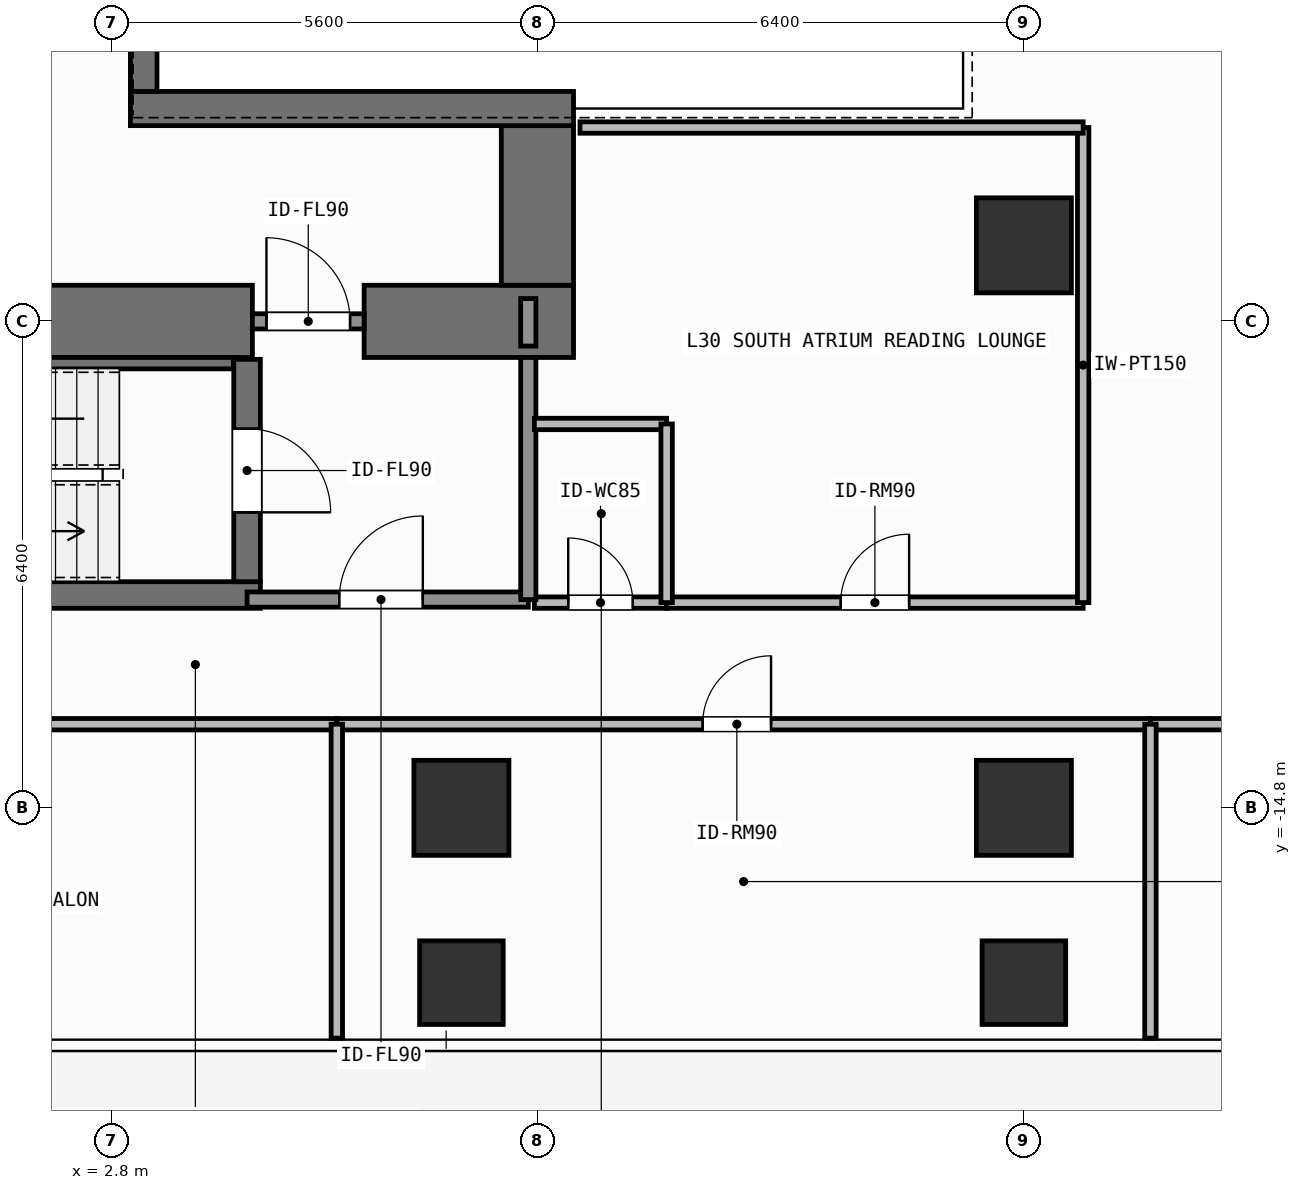
"""IFC4 building model, lengths in metres.
Left out: names, types, materials, properties, quantities, classifications, styles, units other than length and angle.
Written with IfcOpenShell. Run it as: python <this file> out.ifc"""

import sys

from ifc_helpers import new_model, si_unit, direction, frame, frame_2d, origin, origin_2d, place, context, subcontext, project, spatial, rectangle, extrude, element, fill, save


model = new_model("IFC4")
c1 = context("Model", 3, precision=1e-05, world=origin(), true_north=direction((0.0, 1.0)))
c2 = subcontext(c1, "Body", "Model", "MODEL_VIEW")
j1 = project(units=[si_unit("LENGTHUNIT", "METRE"), si_unit("PLANEANGLEUNIT", "RADIAN")], contexts=[c1])
p1 = place(None, origin())
s1 = spatial("IfcSite", under=j1, at=p1, CompositionType="ELEMENT")
p2 = place(p1, origin())
s2 = spatial("IfcBuilding", under=s1, at=p2, CompositionType="ELEMENT")
p3 = place(p2, frame((0.0, 0.0, 121.2)))
s3 = spatial("IfcBuildingStorey", under=s2, at=p3, CompositionType="ELEMENT", Elevation=121.2)
p4 = place(p3, frame((-2.62, -8.4, 0.0), z_axis=(0.0, 0.0, 1.0), x_axis=(1.0, 0.0, 0.0)))
e1 = element("IfcWall", 1, at=p4, inside=s3, PredefinedType="SHEAR", context=c2, shape_type="SweptSolid", body=[
    extrude(rectangle(XDim=7.27, YDim=0.95, at=frame_2d((3.635, 0.0))), origin(), (0.0, 0.0, 1.0), 3.9),
])
p5 = place(p3, frame((6.12, -8.4, 0.0), z_axis=(0.0, 0.0, 1.0), x_axis=(1.0, 0.0, 0.0)))
e2 = element("IfcWall", 2, at=p5, inside=s3, PredefinedType="SHEAR", context=c2, shape_type="SweptSolid", body=[
    extrude(rectangle(XDim=2.755, YDim=0.95, at=frame_2d((1.377, 0.0))), origin(), (0.0, 0.0, 1.0), 3.9),
])
p6 = place(p3, frame((8.4, -7.925, 0.0), z_axis=(0.0, 0.0, 1.0), x_axis=(0.0, 1.0, 0.0)))
e3 = element("IfcWall", 3, at=p6, inside=s3, PredefinedType="SHEAR", context=c2, shape_type="SweptSolid", body=[
    extrude(rectangle(XDim=2.1, YDim=0.95, at=frame_2d((1.05, 0.0))), origin(), (0.0, 0.0, 1.0), 3.9),
])
p7 = place(p3, frame((3.045, -5.6, 0.0), z_axis=(0.0, 0.0, 1.0), x_axis=(1.0, 0.0, 0.0)))
e4 = element("IfcWall", 4, at=p7, inside=s3, PredefinedType="SHEAR", context=c2, shape_type="SweptSolid", body=[
    extrude(rectangle(XDim=5.83, YDim=0.45, at=frame_2d((2.915, 0.0))), origin(), (0.0, 0.0, 1.0), 3.9),
])
p8 = place(p3, frame((3.22, -5.375, 0.0), z_axis=(0.0, 0.0, 1.0), x_axis=(0.0, 1.0, 0.0)))
e5 = element("IfcWall", 5, at=p8, inside=s3, PredefinedType="SHEAR", context=c2, shape_type="SweptSolid", body=[
    extrude(rectangle(XDim=10.75, YDim=0.35, at=frame_2d((5.375, 0.0))), origin(), (0.0, 0.0, 1.0), 3.9),
])
p9 = place(p3, frame((-2.555, -12.0, 0.0), z_axis=(0.0, 0.0, 1.0), x_axis=(1.0, 0.0, 0.0)))
e6 = element("IfcWall", 6, at=p9, inside=s3, PredefinedType="SHEAR", context=c2, shape_type="SweptSolid", body=[
    extrude(rectangle(XDim=7.31, YDim=0.35, at=frame_2d((3.655, 0.0))), origin(), (0.0, 0.0, 1.0), 3.9),
])
p10 = place(p3, frame((-2.2, -8.95, 0.0), z_axis=(0.0, 0.0, 1.0), x_axis=(1.0, 0.0, 0.0)))
e7 = element("IfcWall", 7, at=p10, inside=s3, PredefinedType="SHEAR", context=c2, shape_type="SweptSolid", body=[
    extrude(rectangle(XDim=6.6, YDim=0.15, at=frame_2d((3.3, 0.0))), origin(), (0.0, 0.0, 1.0), 3.9),
])
p11 = place(p3, frame((4.58, -8.9, 0.0), z_axis=(0.0, 0.0, 1.0), x_axis=(0.0, -1.0, 0.0)))
e8 = element("IfcWall", 8, at=p11, inside=s3, PredefinedType="SHEAR", context=c2, shape_type="SweptSolid", body=[
    extrude(rectangle(XDim=2.925, YDim=0.35, at=frame_2d((1.462, 0.0))), origin(), (0.0, 0.0, 1.0), 3.9),
])
p12 = place(p11, frame((0.913, 0.0, 0.0)))
e9 = element("IfcOpeningElement", 9, at=p12, cuts=e8, PredefinedType="OPENING", context=c2, shape_type="SweptSolid", body=[
    extrude(rectangle(XDim=1.1, YDim=2.15, at=frame_2d((0.55, 1.075))), frame((0.0, 0.185, 0.0), z_axis=(0.0, -1.0, 0.0), x_axis=(1.0, 0.0, 0.0)), (0.0, 0.0, 1.0), 0.37),
])
for number, where, z_axis, x_axis in (
    (10, (7.4, -14.8, 0.0), (0.0, 0.0, 1.0), (1.0, 0.0, 0.0)),
    (11, (14.8, -14.8, 0.0), (0.0, 0.0, 1.0), (1.0, 0.0, 0.0)),
    (12, (14.8, -7.4, 0.0), (0.0, 0.0, 1.0), (1.0, 0.0, 0.0)),
):
    element("IfcColumn", number, at=place(p3, frame(where, z_axis=z_axis, x_axis=x_axis)), inside=s3, PredefinedType="COLUMN", context=c2, shape_type="SweptSolid", body=[
        extrude(rectangle(XDim=1.25, YDim=1.25, at=origin_2d()), origin(), (0.0, 0.0, 1.0), 3.9),
    ])
for number, where, z_axis, x_axis in (
    (13, (7.4, -17.1, 0.0), (0.0, 0.0, 1.0), (1.0, 0.0, 0.0)),
    (14, (14.8, -17.1, 0.0), (0.0, 0.0, 1.0), (1.0, 0.0, 0.0)),
):
    element("IfcColumn", number, at=place(p3, frame(where, z_axis=z_axis, x_axis=x_axis)), inside=s3, PredefinedType="COLUMN", context=c2, shape_type="SweptSolid", body=[
        extrude(rectangle(XDim=1.1, YDim=1.1, at=origin_2d()), origin(), (0.0, 0.0, 1.0), 3.9),
    ])
p13 = place(p3, frame((4.58, -12.06, 0.0), z_axis=(0.0, 0.0, 1.0), x_axis=(1.0, 0.0, 0.0)))
e15 = element("IfcWall", 15, at=p13, inside=s3, PredefinedType="SOLIDWALL", context=c2, shape_type="SweptSolid", body=[
    extrude(rectangle(XDim=3.7, YDim=0.2, at=frame_2d((1.85, 0.0))), origin(), (0.0, 0.0, 1.0), 3.68),
])
p14 = place(p13, frame((1.212, 0.0, 0.0)))
e16 = element("IfcOpeningElement", 16, at=p14, cuts=e15, PredefinedType="OPENING", context=c2, shape_type="SweptSolid", body=[
    extrude(rectangle(XDim=1.1, YDim=2.15, at=frame_2d((0.55, 1.075))), frame((0.0, 0.11, 0.0), z_axis=(0.0, -1.0, 0.0), x_axis=(1.0, 0.0, 0.0)), (0.0, 0.0, 1.0), 0.22),
])
p15 = place(p3, frame((4.65, -8.4, 0.0), z_axis=(0.0, 0.0, 1.0), x_axis=(1.0, 0.0, 0.0)))
e17 = element("IfcWall", 17, at=p15, inside=s3, PredefinedType="SOLIDWALL", context=c2, shape_type="SweptSolid", body=[
    extrude(rectangle(XDim=1.47, YDim=0.2, at=frame_2d((0.735, 0.0))), origin(), (0.0, 0.0, 1.0), 2.72),
])
p16 = place(p15, frame((0.185, 0.0, 0.0)))
e18 = element("IfcOpeningElement", 18, at=p16, cuts=e17, PredefinedType="OPENING", context=c2, shape_type="SweptSolid", body=[
    extrude(rectangle(XDim=1.1, YDim=2.15, at=frame_2d((0.55, 1.075))), frame((0.0, 0.11, 0.0), z_axis=(0.0, -1.0, 0.0), x_axis=(1.0, 0.0, 0.0)), (0.0, 0.0, 1.0), 0.22),
])
p17 = place(p3, frame((8.36, -12.1, 0.0), z_axis=(0.0, 0.0, 1.0), x_axis=(1.0, 0.0, 0.0)))
e19 = element("IfcWall", 19, at=p17, inside=s3, PredefinedType="PARTITIONING", context=c2, shape_type="SweptSolid", body=[
    extrude(rectangle(XDim=1.74, YDim=0.15, at=frame_2d((0.87, 0.0))), origin(), (0.0, 0.0, 1.0), 3.68),
])
p18 = place(p17, frame((0.445, 0.0, 0.0)))
e20 = element("IfcOpeningElement", 20, at=p18, cuts=e19, PredefinedType="OPENING", context=c2, shape_type="SweptSolid", body=[
    extrude(rectangle(XDim=0.85, YDim=2.1, at=frame_2d((0.425, 1.05))), frame((0.0, 0.085, 0.0), z_axis=(0.0, -1.0, 0.0), x_axis=(1.0, 0.0, 0.0)), (0.0, 0.0, 1.0), 0.17),
])
p19 = place(p3, frame((10.1, -12.1, 0.0), z_axis=(0.0, 0.0, 1.0), x_axis=(1.0, 0.0, 0.0)))
e21 = element("IfcWall", 21, at=p19, inside=s3, PredefinedType="PARTITIONING", context=c2, shape_type="SweptSolid", body=[
    extrude(rectangle(XDim=5.48, YDim=0.15, at=frame_2d((2.74, 0.0))), origin(), (0.0, 0.0, 1.0), 3.68),
])
p20 = place(p19, frame((2.29, 0.0, 0.0)))
e22 = element("IfcOpeningElement", 22, at=p20, cuts=e21, PredefinedType="OPENING", context=c2, shape_type="SweptSolid", body=[
    extrude(rectangle(XDim=0.9, YDim=2.1, at=frame_2d((0.45, 1.05))), frame((0.0, 0.085, 0.0), z_axis=(0.0, -1.0, 0.0), x_axis=(1.0, 0.0, 0.0)), (0.0, 0.0, 1.0), 0.17),
])
p21 = place(p3, frame((-4.012, -13.7, 0.0), z_axis=(0.0, 0.0, 1.0), x_axis=(1.0, 0.0, 0.0)))
e23 = element("IfcWall", 23, at=p21, inside=s3, PredefinedType="PARTITIONING", context=c2, shape_type="SweptSolid", body=[
    extrude(rectangle(XDim=9.773, YDim=0.15, at=frame_2d((4.886, 0.0))), origin(), (0.0, 0.0, 1.0), 3.68),
])
p22 = place(p21, frame((4.793, 0.0, 0.0)))
e24 = element("IfcOpeningElement", 24, at=p22, cuts=e23, PredefinedType="OPENING", context=c2, shape_type="SweptSolid", body=[
    extrude(rectangle(XDim=0.9, YDim=2.1, at=frame_2d((0.45, 1.05))), frame((0.0, 0.085, 0.0), z_axis=(0.0, -1.0, 0.0), x_axis=(1.0, 0.0, 0.0)), (0.0, 0.0, 1.0), 0.17),
])
p23 = place(p3, frame((5.761, -13.7, 0.0), z_axis=(0.0, 0.0, 1.0), x_axis=(1.0, 0.0, 0.0)))
e25 = element("IfcWall", 25, at=p23, inside=s3, PredefinedType="PARTITIONING", context=c2, shape_type="SweptSolid", body=[
    extrude(rectangle(XDim=10.704, YDim=0.15, at=frame_2d((5.352, 0.0))), origin(), (0.0, 0.0, 1.0), 3.68),
])
p24 = place(p23, frame((4.812, 0.0, 0.0)))
e26 = element("IfcOpeningElement", 26, at=p24, cuts=e25, PredefinedType="OPENING", context=c2, shape_type="SweptSolid", body=[
    extrude(rectangle(XDim=0.9, YDim=2.1, at=frame_2d((0.45, 1.05))), frame((0.0, 0.085, 0.0), z_axis=(0.0, -1.0, 0.0), x_axis=(1.0, 0.0, 0.0)), (0.0, 0.0, 1.0), 0.17),
])
p25 = place(p3, frame((16.465, -13.7, 0.0), z_axis=(0.0, 0.0, 1.0), x_axis=(1.0, 0.0, 0.0)))
e27 = element("IfcWall", 27, at=p25, inside=s3, PredefinedType="PARTITIONING", context=c2, shape_type="SweptSolid", body=[
    extrude(rectangle(XDim=10.665, YDim=0.15, at=frame_2d((5.333, 0.0))), origin(), (0.0, 0.0, 1.0), 3.68),
])
p26 = place(p25, frame((4.793, 0.0, 0.0)))
e28 = element("IfcOpeningElement", 28, at=p26, cuts=e27, PredefinedType="OPENING", context=c2, shape_type="SweptSolid", body=[
    extrude(rectangle(XDim=0.9, YDim=2.1, at=frame_2d((0.45, 1.05))), frame((0.0, 0.085, 0.0), z_axis=(0.0, -1.0, 0.0), x_axis=(1.0, 0.0, 0.0)), (0.0, 0.0, 1.0), 0.17),
])
p27 = place(p3, frame((8.28, -12.06, 0.0), z_axis=(0.0, 0.0, 1.0), x_axis=(0.0, 1.0, 0.0)))
e29 = element("IfcWall", 29, at=p27, inside=s3, PredefinedType="SOLIDWALL", context=c2, shape_type="SweptSolid", body=[
    extrude(rectangle(XDim=3.185, YDim=0.2, at=frame_2d((1.593, 0.0))), origin(), (0.0, 0.0, 1.0), 3.68),
])
p28 = place(p3, frame((8.28, -8.725, 0.0), z_axis=(0.0, 0.0, 1.0), x_axis=(0.0, 1.0, 0.0)))
e30 = element("IfcWall", 30, at=p28, inside=s3, PredefinedType="SOLIDWALL", context=c2, shape_type="SweptSolid", body=[
    extrude(rectangle(XDim=0.625, YDim=0.2, at=frame_2d((0.312, 0.0))), origin(), (0.0, 0.0, 1.0), 3.68),
])
p29 = place(p3, frame((8.36, -9.75, 0.0), z_axis=(0.0, 0.0, 1.0), x_axis=(1.0, 0.0, 0.0)))
e31 = element("IfcWall", 31, at=p29, inside=s3, PredefinedType="PARTITIONING", context=c2, shape_type="SweptSolid", body=[
    extrude(rectangle(XDim=1.74, YDim=0.15, at=frame_2d((0.87, 0.0))), origin(), (0.0, 0.0, 1.0), 3.68),
])
p30 = place(p3, frame((10.1, -12.1, 0.0), z_axis=(0.0, 0.0, 1.0), x_axis=(0.0, 1.0, 0.0)))
e32 = element("IfcWall", 32, at=p30, inside=s3, PredefinedType="PARTITIONING", context=c2, shape_type="SweptSolid", body=[
    extrude(rectangle(XDim=2.35, YDim=0.15, at=frame_2d((1.175, 0.0))), origin(), (0.0, 0.0, 1.0), 3.68),
])
p31 = place(p3, frame((15.58, -12.1, 0.0), z_axis=(0.0, 0.0, 1.0), x_axis=(0.0, 1.0, 0.0)))
e33 = element("IfcWall", 33, at=p31, inside=s3, PredefinedType="PARTITIONING", context=c2, shape_type="SweptSolid", body=[
    extrude(rectangle(XDim=6.25, YDim=0.15, at=frame_2d((3.125, 0.0))), origin(), (0.0, 0.0, 1.0), 3.68),
])
p32 = place(p3, frame((8.96, -5.85, 0.0), z_axis=(0.0, 0.0, 1.0), x_axis=(1.0, 0.0, 0.0)))
e34 = element("IfcWall", 34, at=p32, inside=s3, PredefinedType="PARTITIONING", context=c2, shape_type="SweptSolid", body=[
    extrude(rectangle(XDim=6.62, YDim=0.15, at=frame_2d((3.31, 0.0))), origin(), (0.0, 0.0, 1.0), 3.68),
])
for number, where, z_axis, x_axis in (
    (35, (5.761, -17.83, 0.0), (0.0, 0.0, 1.0), (0.0, 1.0, 0.0)),
    (36, (16.465, -17.83, 0.0), (0.0, 0.0, 1.0), (0.0, 1.0, 0.0)),
):
    element("IfcWall", number, at=place(p3, frame(where, z_axis=z_axis, x_axis=x_axis)), inside=s3, PredefinedType="PARTITIONING", context=c2, shape_type="SweptSolid", body=[
        extrude(rectangle(XDim=4.13, YDim=0.15, at=frame_2d((2.065, 0.0))), origin(), (0.0, 0.0, 1.0), 3.68),
    ])
p33 = place(p12, origin())
e37 = element("IfcDoor", 37, at=p33, inside=s3, OperationType="SINGLE_SWING_RIGHT", PredefinedType="DOOR", context=c2, shape_type="SweptSolid", body=[
    extrude(rectangle(XDim=1.1, YDim=2.15, at=frame_2d((0.55, 1.075))), frame((0.0, 0.025, 0.0), z_axis=(0.0, -1.0, 0.0), x_axis=(1.0, 0.0, 0.0)), (0.0, 0.0, 1.0), 0.05),
])
fill(e9, e37)
p34 = place(p14, origin())
e38 = element("IfcDoor", 38, at=p34, inside=s3, OperationType="SINGLE_SWING_RIGHT", PredefinedType="DOOR", context=c2, shape_type="SweptSolid", body=[
    extrude(rectangle(XDim=1.1, YDim=2.15, at=frame_2d((0.55, 1.075))), frame((0.0, 0.025, 0.0), z_axis=(0.0, -1.0, 0.0), x_axis=(1.0, 0.0, 0.0)), (0.0, 0.0, 1.0), 0.05),
])
fill(e16, e38)
p35 = place(p16, origin())
e39 = element("IfcDoor", 39, at=p35, inside=s3, OperationType="SINGLE_SWING_LEFT", PredefinedType="DOOR", context=c2, shape_type="SweptSolid", body=[
    extrude(rectangle(XDim=1.1, YDim=2.15, at=frame_2d((0.55, 1.075))), frame((0.0, 0.025, 0.0), z_axis=(0.0, -1.0, 0.0), x_axis=(1.0, 0.0, 0.0)), (0.0, 0.0, 1.0), 0.05),
])
fill(e18, e39)
p36 = place(p18, origin())
e40 = element("IfcDoor", 40, at=p36, inside=s3, OperationType="SINGLE_SWING_LEFT", PredefinedType="DOOR", context=c2, shape_type="SweptSolid", body=[
    extrude(rectangle(XDim=0.85, YDim=2.1, at=frame_2d((0.425, 1.05))), frame((0.0, 0.025, 0.0), z_axis=(0.0, -1.0, 0.0), x_axis=(1.0, 0.0, 0.0)), (0.0, 0.0, 1.0), 0.05),
])
fill(e20, e40)
p37 = place(p20, origin())
e41 = element("IfcDoor", 41, at=p37, inside=s3, OperationType="SINGLE_SWING_RIGHT", PredefinedType="DOOR", context=c2, shape_type="SweptSolid", body=[
    extrude(rectangle(XDim=0.9, YDim=2.1, at=frame_2d((0.45, 1.05))), frame((0.0, 0.025, 0.0), z_axis=(0.0, -1.0, 0.0), x_axis=(1.0, 0.0, 0.0)), (0.0, 0.0, 1.0), 0.05),
])
fill(e22, e41)
p38 = place(p24, origin())
e42 = element("IfcDoor", 42, at=p38, inside=s3, OperationType="SINGLE_SWING_RIGHT", PredefinedType="DOOR", context=c2, shape_type="SweptSolid", body=[
    extrude(rectangle(XDim=0.9, YDim=2.1, at=frame_2d((0.45, 1.05))), frame((0.0, 0.025, 0.0), z_axis=(0.0, -1.0, 0.0), x_axis=(1.0, 0.0, 0.0)), (0.0, 0.0, 1.0), 0.05),
])
fill(e26, e42)
save(model, sys.argv[1])
